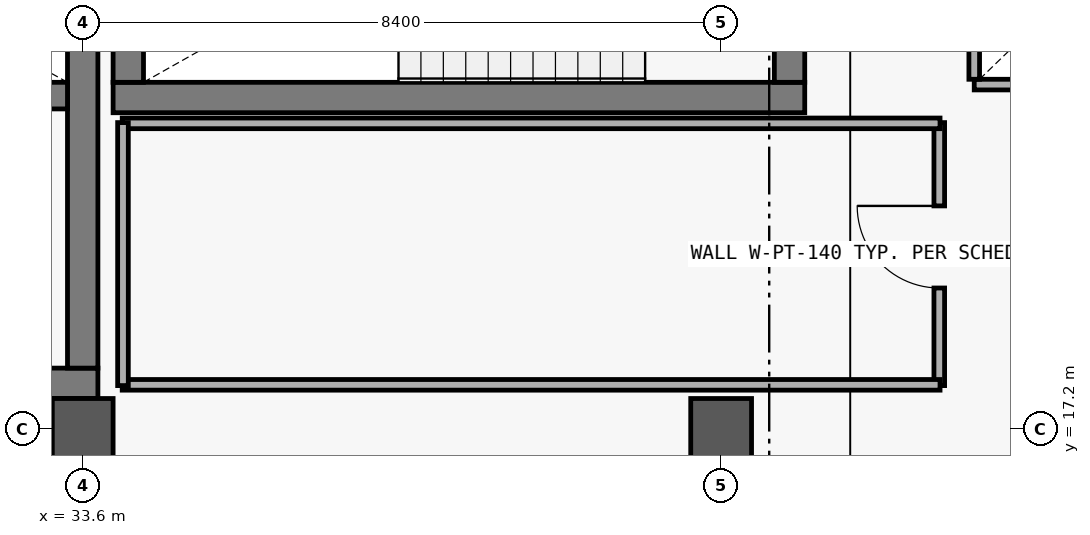
"""IFC4 building model, lengths in metres.
Left out: names, types, materials, properties, quantities, classifications, styles, units other than length and angle.
Written with IfcOpenShell. Run it as: python <this file> out.ifc"""

import sys

from ifc_helpers import new_model, si_unit, direction, frame, frame_2d, origin, origin_2d, place, context, subcontext, project, spatial, rectangle, extrude, element, fill, save


model = new_model("IFC4")
c1 = context("Model", 3, precision=1e-05, world=origin(), true_north=direction((0.0, 1.0)))
c2 = subcontext(c1, "Body", "Model", "MODEL_VIEW")
j1 = project(units=[si_unit("LENGTHUNIT", "METRE"), si_unit("PLANEANGLEUNIT", "RADIAN")], contexts=[c1])
p1 = place(None, origin())
s1 = spatial("IfcSite", under=j1, at=p1, CompositionType="ELEMENT")
p2 = place(p1, origin())
s2 = spatial("IfcBuilding", under=s1, at=p2, CompositionType="ELEMENT")
p3 = place(p2, frame((0.0, 0.0, 10.8)))
s3 = spatial("IfcBuildingStorey", under=s2, at=p3, CompositionType="ELEMENT", Elevation=10.8)
for number, where, z_axis, x_axis in (
    (1, (33.6, 17.2, 0.0), (0.0, 0.0, 1.0), (1.0, 0.0, 0.0)),
    (2, (42.0, 17.2, 0.0), (0.0, 0.0, 1.0), (1.0, 0.0, 0.0)),
):
    element("IfcColumn", number, at=place(p3, frame(where, z_axis=z_axis, x_axis=x_axis)), inside=s3, PredefinedType="COLUMN", context=c2, shape_type="SweptSolid", body=[
        extrude(rectangle(XDim=0.8, YDim=0.8, at=origin_2d()), origin(), (0.0, 0.0, 1.0), 4.2),
    ])
p4 = place(p3, frame((24.6, 17.8, 0.0), z_axis=(0.0, 0.0, 1.0), x_axis=(1.0, 0.0, 0.0)))
e3 = element("IfcWall", 3, at=p4, inside=s3, PredefinedType="SHEAR", context=c2, shape_type="SweptSolid", body=[
    extrude(rectangle(XDim=9.2, YDim=0.4, at=frame_2d((4.6, 0.0))), origin(), (0.0, 0.0, 1.0), 3.92),
])
p5 = place(p4, frame((1.1, 0.0, 0.0)))
e4 = element("IfcOpeningElement", 4, at=p5, cuts=e3, PredefinedType="OPENING", context=c2, shape_type="SweptSolid", body=[
    extrude(rectangle(XDim=1.2, YDim=2.2, at=frame_2d((0.6, 1.1))), frame((0.0, 0.21, 0.0), z_axis=(0.0, -1.0, 0.0), x_axis=(1.0, 0.0, 0.0)), (0.0, 0.0, 1.0), 0.42),
])
p6 = place(p4, frame((3.5, 0.0, 0.0)))
e5 = element("IfcOpeningElement", 5, at=p6, cuts=e3, PredefinedType="OPENING", context=c2, shape_type="SweptSolid", body=[
    extrude(rectangle(XDim=1.1, YDim=2.2, at=frame_2d((0.55, 1.1))), frame((0.0, 0.21, 0.0), z_axis=(0.0, -1.0, 0.0), x_axis=(1.0, 0.0, 0.0)), (0.0, 0.0, 1.0), 0.42),
])
p7 = place(p4, frame((5.9, 0.0, 0.0)))
e6 = element("IfcOpeningElement", 6, at=p7, cuts=e3, PredefinedType="OPENING", context=c2, shape_type="SweptSolid", body=[
    extrude(rectangle(XDim=1.1, YDim=2.2, at=frame_2d((0.55, 1.1))), frame((0.0, 0.21, 0.0), z_axis=(0.0, -1.0, 0.0), x_axis=(1.0, 0.0, 0.0)), (0.0, 0.0, 1.0), 0.42),
])
p8 = place(p3, frame((33.6, 18.0, 0.0), z_axis=(0.0, 0.0, 1.0), x_axis=(0.0, 1.0, 0.0)))
e7 = element("IfcWall", 7, at=p8, inside=s3, PredefinedType="SHEAR", context=c2, shape_type="SweptSolid", body=[
    extrude(rectangle(XDim=7.4, YDim=0.4, at=frame_2d((3.7, 0.0))), origin(), (0.0, 0.0, 1.0), 3.92),
])
p9 = place(p3, frame((25.0, 21.585, 0.0), z_axis=(0.0, 0.0, 1.0), x_axis=(1.0, 0.0, 0.0)))
e8 = element("IfcWall", 8, at=p9, inside=s3, PredefinedType="SHEAR", context=c2, shape_type="SweptSolid", body=[
    extrude(rectangle(XDim=8.4, YDim=0.35, at=frame_2d((4.2, 0.0))), origin(), (0.0, 0.0, 1.0), 3.92),
])
p10 = place(p3, frame((34.0, 21.56, 0.0), z_axis=(0.0, 0.0, 1.0), x_axis=(1.0, 0.0, 0.0)))
e9 = element("IfcWall", 9, at=p10, inside=s3, PredefinedType="SHEAR", context=c2, shape_type="SweptSolid", body=[
    extrude(rectangle(XDim=9.1, YDim=0.4, at=frame_2d((4.55, 0.0))), origin(), (0.0, 0.0, 1.0), 3.92),
])
p11 = place(p3, frame((34.2, 25.4, 0.0), z_axis=(0.0, 0.0, 1.0), x_axis=(0.0, -1.0, 0.0)))
e10 = element("IfcWall", 10, at=p11, inside=s3, PredefinedType="SHEAR", context=c2, shape_type="SweptSolid", body=[
    extrude(rectangle(XDim=3.64, YDim=0.4, at=frame_2d((1.82, 0.0))), origin(), (0.0, 0.0, 1.0), 3.92),
])
p12 = place(p3, frame((42.9, 21.76, 0.0), z_axis=(0.0, 0.0, 1.0), x_axis=(0.0, 1.0, 0.0)))
e11 = element("IfcWall", 11, at=p12, inside=s3, PredefinedType="SHEAR", context=c2, shape_type="SweptSolid", body=[
    extrude(rectangle(XDim=3.64, YDim=0.4, at=frame_2d((1.82, 0.0))), origin(), (0.0, 0.0, 1.0), 3.92),
])
p13 = place(p12, frame((2.14, 0.0, 0.0)))
e12 = element("IfcOpeningElement", 12, at=p13, cuts=e11, PredefinedType="OPENING", context=c2, shape_type="SweptSolid", body=[
    extrude(rectangle(XDim=1.15, YDim=2.2, at=frame_2d((0.575, 1.1))), frame((0.0, 0.21, 0.0), z_axis=(0.0, -1.0, 0.0), x_axis=(1.0, 0.0, 0.0)), (0.0, 0.0, 1.0), 0.42),
])
p14 = place(p3, frame((44.87, 17.77, 0.0), z_axis=(0.0, 0.0, 1.0), x_axis=(0.0, 1.0, 0.0)))
e13 = element("IfcWall", 13, at=p14, inside=s3, PredefinedType="PARTITIONING", context=c2, shape_type="SweptSolid", body=[
    extrude(rectangle(XDim=3.46, YDim=0.14, at=frame_2d((1.73, 0.0))), origin(), (0.0, 0.0, 1.0), 3.02),
])
p15 = place(p14, frame((1.284, 0.0, 0.0)))
e14 = element("IfcOpeningElement", 14, at=p15, cuts=e13, PredefinedType="OPENING", context=c2, shape_type="SweptSolid", body=[
    extrude(rectangle(XDim=1.08, YDim=2.25, at=frame_2d((0.54, 1.125))), frame((0.0, 0.08, 0.0), z_axis=(0.0, -1.0, 0.0), x_axis=(1.0, 0.0, 0.0)), (0.0, 0.0, 1.0), 0.16),
])
for number, where, z_axis, x_axis in (
    (15, (34.12, 17.78, 0.0), (0.0, 0.0, 1.0), (1.0, 0.0, 0.0)),
    (16, (34.12, 21.22, 0.0), (0.0, 0.0, 1.0), (1.0, 0.0, 0.0)),
):
    element("IfcWall", number, at=place(p3, frame(where, z_axis=z_axis, x_axis=x_axis)), inside=s3, PredefinedType="PARTITIONING", context=c2, shape_type="SweptSolid", body=[
        extrude(rectangle(XDim=10.76, YDim=0.14, at=frame_2d((5.38, 0.0))), origin(), (0.0, 0.0, 1.0), 3.02),
    ])
p16 = place(p3, frame((34.13, 17.77, 0.0), z_axis=(0.0, 0.0, 1.0), x_axis=(0.0, 1.0, 0.0)))
e17 = element("IfcWall", 17, at=p16, inside=s3, PredefinedType="PARTITIONING", context=c2, shape_type="SweptSolid", body=[
    extrude(rectangle(XDim=3.46, YDim=0.14, at=frame_2d((1.73, 0.0))), origin(), (0.0, 0.0, 1.0), 3.02),
])
p17 = place(p3, frame((45.33, 21.73, 0.0), z_axis=(0.0, 0.0, 1.0), x_axis=(1.0, 0.0, 0.0)))
e18 = element("IfcWall", 18, at=p17, inside=s3, PredefinedType="PARTITIONING", context=c2, shape_type="SweptSolid", body=[
    extrude(rectangle(XDim=1.36, YDim=0.14, at=frame_2d((0.68, 0.0))), origin(), (0.0, 0.0, 1.0), 3.04),
])
p18 = place(p3, frame((45.33, 22.98, 0.0), z_axis=(0.0, 0.0, 1.0), x_axis=(0.0, -1.0, 0.0)))
e19 = element("IfcWall", 19, at=p18, inside=s3, PredefinedType="PARTITIONING", context=c2, shape_type="SweptSolid", body=[
    extrude(rectangle(XDim=1.18, YDim=0.14, at=frame_2d((0.59, 0.0))), origin(), (0.0, 0.0, 1.0), 3.04),
])
p19 = place(p15, origin())
e20 = element("IfcDoor", 20, at=p19, inside=s3, OperationType="SINGLE_SWING_RIGHT", PredefinedType="DOOR", context=c2, shape_type="SweptSolid", body=[
    extrude(rectangle(XDim=1.08, YDim=2.25, at=frame_2d((0.54, 1.125))), frame((0.0, 0.025, 0.0), z_axis=(0.0, -1.0, 0.0), x_axis=(1.0, 0.0, 0.0)), (0.0, 0.0, 1.0), 0.05),
])
fill(e14, e20)
save(model, sys.argv[1])
